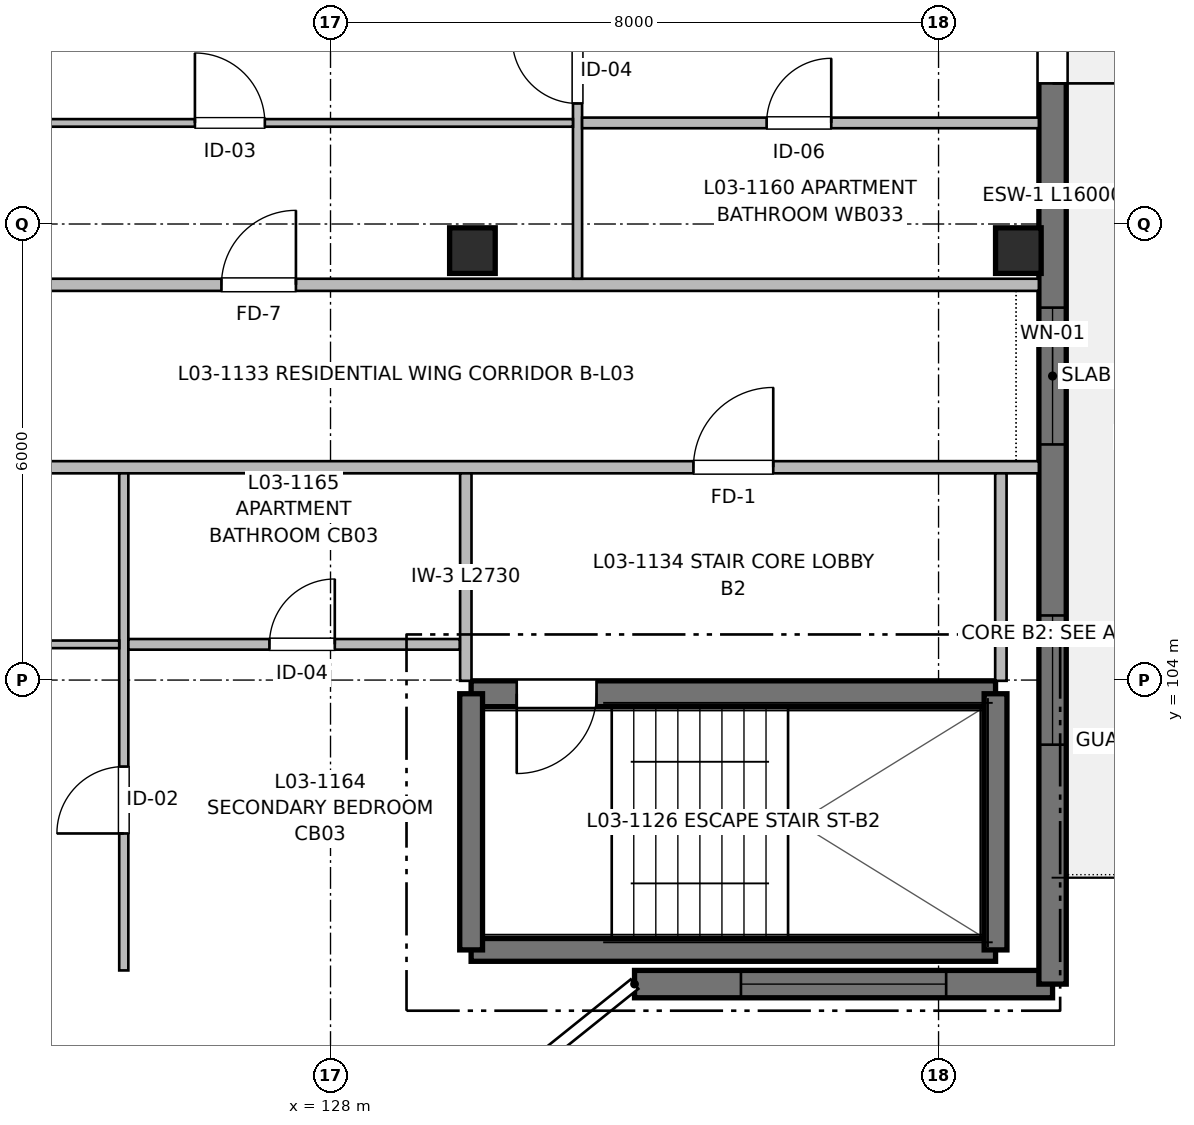
"""IFC4 building model, lengths in metres.
Left out: names, types, materials, properties, quantities, classifications, styles, units other than length and angle.
Written with IfcOpenShell. Run it as: python <this file> out.ifc"""

import sys

from ifc_helpers import new_model, si_unit, direction, frame, frame_2d, origin, origin_2d, place, context, subcontext, project, spatial, rectangle, extrude, element, fill, save


model = new_model("IFC4")
c1 = context("Model", 3, precision=1e-05, world=origin(), true_north=direction((0.0, 1.0)))
c2 = subcontext(c1, "Body", "Model", "MODEL_VIEW")
j1 = project(units=[si_unit("LENGTHUNIT", "METRE"), si_unit("PLANEANGLEUNIT", "RADIAN")], contexts=[c1])
p1 = place(None, origin())
s1 = spatial("IfcSite", under=j1, at=p1, CompositionType="ELEMENT")
p2 = place(p1, origin())
s2 = spatial("IfcBuilding", under=s1, at=p2, CompositionType="ELEMENT")
p3 = place(p2, frame((0.0, 0.0, 10.56)))
s3 = spatial("IfcBuildingStorey", under=s2, at=p3, CompositionType="ELEMENT", Elevation=10.56)
for number, where, z_axis, x_axis in (
    (1, (129.867, 109.65, 0.0), (0.0, 0.0, 1.0), (1.0, 0.0, 0.0)),
    (2, (137.05, 109.65, 0.0), (0.0, 0.0, 1.0), (1.0, 0.0, 0.0)),
):
    element("IfcColumn", number, at=place(p3, frame(where, z_axis=z_axis, x_axis=x_axis)), inside=s3, PredefinedType="COLUMN", context=c2, shape_type="SweptSolid", body=[
        extrude(rectangle(XDim=0.6, YDim=0.6, at=origin_2d()), origin(), (0.0, 0.0, 1.0), 3.2),
    ])
p4 = place(p3, frame((129.85, 100.45, 0.0), z_axis=(0.0, 0.0, 1.0), x_axis=(1.0, 0.0, 0.0)))
e3 = element("IfcWall", 3, at=p4, inside=s3, PredefinedType="SHEAR", context=c2, shape_type="SweptSolid", body=[
    extrude(rectangle(XDim=6.9, YDim=0.3, at=frame_2d((3.45, 0.0))), origin(), (0.0, 0.0, 1.0), 3.2),
])
p5 = place(p3, frame((136.75, 103.82, 0.0), z_axis=(0.0, 0.0, 1.0), x_axis=(-1.0, 0.0, 0.0)))
e4 = element("IfcWall", 4, at=p5, inside=s3, PredefinedType="SHEAR", context=c2, shape_type="SweptSolid", body=[
    extrude(rectangle(XDim=6.9, YDim=0.34, at=frame_2d((3.45, 0.0))), origin(), (0.0, 0.0, 1.0), 3.2),
])
p6 = place(p5, frame((5.25, 0.0, 0.0)))
e5 = element("IfcOpeningElement", 5, at=p6, cuts=e4, PredefinedType="OPENING", context=c2, shape_type="SweptSolid", body=[
    extrude(rectangle(XDim=1.05, YDim=2.15, at=frame_2d((0.525, 1.075))), frame((0.0, 0.18, 0.0), z_axis=(0.0, -1.0, 0.0), x_axis=(1.0, 0.0, 0.0)), (0.0, 0.0, 1.0), 0.36),
])
for number, where, z_axis, x_axis in (
    (6, (129.85, 103.82, 0.0), (0.0, 0.0, 1.0), (0.0, -1.0, 0.0)),
    (7, (136.75, 100.45, 0.0), (0.0, 0.0, 1.0), (0.0, 1.0, 0.0)),
):
    element("IfcWall", number, at=place(p3, frame(where, z_axis=z_axis, x_axis=x_axis)), inside=s3, PredefinedType="SHEAR", context=c2, shape_type="SweptSolid", body=[
        extrude(rectangle(XDim=3.37, YDim=0.3, at=frame_2d((1.685, 0.0))), origin(), (0.0, 0.0, 1.0), 3.2),
    ])
p7 = place(p3, frame((137.5, 100.0, 0.0), z_axis=(0.0, 0.0, 1.0), x_axis=(-1.0, 0.0, 0.0)))
e8 = element("IfcWall", 8, at=p7, inside=s3, PredefinedType="SHEAR", context=c2, shape_type="SweptSolid", body=[
    extrude(rectangle(XDim=5.5, YDim=0.36, at=frame_2d((2.75, 0.0))), origin(), (0.0, 0.0, 1.0), 2.98),
])
p8 = place(p7, frame((1.4, 0.0, 0.47)))
e9 = element("IfcOpeningElement", 9, at=p8, cuts=e8, PredefinedType="OPENING", context=c2, shape_type="SweptSolid", body=[
    extrude(rectangle(XDim=2.7, YDim=1.75, at=frame_2d((1.35, 0.875))), frame((0.0, 0.19, 0.0), z_axis=(0.0, -1.0, 0.0), x_axis=(1.0, 0.0, 0.0)), (0.0, 0.0, 1.0), 0.38),
])
p9 = place(p3, frame((137.5, 116.0, 0.0), z_axis=(0.0, 0.0, 1.0), x_axis=(0.0, -1.0, 0.0)))
e10 = element("IfcWall", 10, at=p9, inside=s3, PredefinedType="SHEAR", context=c2, shape_type="SweptSolid", body=[
    extrude(rectangle(XDim=16.0, YDim=0.36, at=frame_2d((8.0, 0.0))), origin(), (0.0, 0.0, 1.0), 2.98),
])
p10 = place(p9, frame((2.95, 0.0, 0.0)))
e11 = element("IfcOpeningElement", 11, at=p10, cuts=e10, PredefinedType="OPENING", context=c2, shape_type="SweptSolid", body=[
    extrude(rectangle(XDim=1.2, YDim=2.2, at=frame_2d((0.6, 1.1))), frame((0.0, 0.19, 0.0), z_axis=(0.0, -1.0, 0.0), x_axis=(1.0, 0.0, 0.0)), (0.0, 0.0, 1.0), 0.38),
])
p11 = place(p9, frame((7.1, 0.0, 0.72)))
e12 = element("IfcOpeningElement", 12, at=p11, cuts=e10, PredefinedType="OPENING", context=c2, shape_type="SweptSolid", body=[
    extrude(rectangle(XDim=1.8, YDim=1.5, at=frame_2d((0.9, 0.75))), frame((0.0, 0.19, 0.0), z_axis=(0.0, -1.0, 0.0), x_axis=(1.0, 0.0, 0.0)), (0.0, 0.0, 1.0), 0.38),
])
p12 = place(p9, frame((11.15, 0.0, 0.72)))
e13 = element("IfcOpeningElement", 13, at=p12, cuts=e10, PredefinedType="OPENING", context=c2, shape_type="SweptSolid", body=[
    extrude(rectangle(XDim=1.7, YDim=1.5, at=frame_2d((0.85, 0.75))), frame((0.0, 0.19, 0.0), z_axis=(0.0, -1.0, 0.0), x_axis=(1.0, 0.0, 0.0)), (0.0, 0.0, 1.0), 0.38),
])
p13 = place(p3, frame((113.2, 106.8, 0.0), z_axis=(0.0, 0.0, 1.0), x_axis=(1.0, 0.0, 0.0)))
e14 = element("IfcWall", 14, at=p13, inside=s3, PredefinedType="PARTITIONING", context=c2, shape_type="SweptSolid", body=[
    extrude(rectangle(XDim=24.12, YDim=0.16, at=frame_2d((12.06, 0.0))), origin(), (0.0, 0.0, 1.0), 2.935),
])
p14 = place(p13, frame((19.575, 0.0, 0.0)))
e15 = element("IfcOpeningElement", 15, at=p14, cuts=e14, PredefinedType="OPENING", context=c2, shape_type="SweptSolid", body=[
    extrude(rectangle(XDim=1.05, YDim=2.15, at=frame_2d((0.525, 1.075))), frame((0.0, 0.09, 0.0), z_axis=(0.0, -1.0, 0.0), x_axis=(1.0, 0.0, 0.0)), (0.0, 0.0, 1.0), 0.18),
])
p15 = place(p13, frame((8.995, 0.0, 0.0)))
e16 = element("IfcOpeningElement", 16, at=p15, cuts=e14, PredefinedType="OPENING", context=c2, shape_type="SweptSolid", body=[
    extrude(rectangle(XDim=0.98, YDim=2.15, at=frame_2d((0.49, 1.075))), frame((0.0, 0.09, 0.0), z_axis=(0.0, -1.0, 0.0), x_axis=(1.0, 0.0, 0.0)), (0.0, 0.0, 1.0), 0.18),
])
p16 = place(p3, frame((93.68, 109.2, 0.0), z_axis=(0.0, 0.0, 1.0), x_axis=(1.0, 0.0, 0.0)))
e17 = element("IfcWall", 17, at=p16, inside=s3, PredefinedType="PARTITIONING", context=c2, shape_type="SweptSolid", body=[
    extrude(rectangle(XDim=43.64, YDim=0.16, at=frame_2d((21.82, 0.0))), origin(), (0.0, 0.0, 1.0), 2.935),
])
p17 = place(p16, frame((3.705, 0.0, 0.0)))
e18 = element("IfcOpeningElement", 18, at=p17, cuts=e17, PredefinedType="OPENING", context=c2, shape_type="SweptSolid", body=[
    extrude(rectangle(XDim=0.98, YDim=2.15, at=frame_2d((0.49, 1.075))), frame((0.0, 0.09, 0.0), z_axis=(0.0, -1.0, 0.0), x_axis=(1.0, 0.0, 0.0)), (0.0, 0.0, 1.0), 0.18),
])
p18 = place(p16, frame((18.315, 0.0, 0.0)))
e19 = element("IfcOpeningElement", 19, at=p18, cuts=e17, PredefinedType="OPENING", context=c2, shape_type="SweptSolid", body=[
    extrude(rectangle(XDim=0.98, YDim=2.15, at=frame_2d((0.49, 1.075))), frame((0.0, 0.09, 0.0), z_axis=(0.0, -1.0, 0.0), x_axis=(1.0, 0.0, 0.0)), (0.0, 0.0, 1.0), 0.18),
])
p19 = place(p16, frame((32.885, 0.0, 0.0)))
e20 = element("IfcOpeningElement", 20, at=p19, cuts=e17, PredefinedType="OPENING", context=c2, shape_type="SweptSolid", body=[
    extrude(rectangle(XDim=0.98, YDim=2.15, at=frame_2d((0.49, 1.075))), frame((0.0, 0.09, 0.0), z_axis=(0.0, -1.0, 0.0), x_axis=(1.0, 0.0, 0.0)), (0.0, 0.0, 1.0), 0.18),
])
for number, where, z_axis, x_axis in (
    (21, (129.78, 103.99, 0.0), (0.0, 0.0, 1.0), (0.0, 1.0, 0.0)),
    (22, (136.82, 103.99, 0.0), (0.0, 0.0, 1.0), (0.0, 1.0, 0.0)),
):
    element("IfcWall", number, at=place(p3, frame(where, z_axis=z_axis, x_axis=x_axis)), inside=s3, PredefinedType="PARTITIONING", context=c2, shape_type="SweptSolid", body=[
        extrude(rectangle(XDim=2.73, YDim=0.15, at=frame_2d((1.365, 0.0))), origin(), (0.0, 0.0, 1.0), 2.935),
    ])
p20 = place(p3, frame((131.25, 109.28, 0.0), z_axis=(0.0, 0.0, 1.0), x_axis=(0.0, 1.0, 0.0)))
e23 = element("IfcWall", 23, at=p20, inside=s3, PredefinedType="PARTITIONING", context=c2, shape_type="SweptSolid", body=[
    extrude(rectangle(XDim=6.6, YDim=0.12, at=frame_2d((3.3, 0.0))), origin(), (0.0, 0.0, 1.0), 2.935),
])
p21 = place(p20, frame((2.306, 0.0, 0.0)))
e24 = element("IfcOpeningElement", 24, at=p21, cuts=e23, PredefinedType="OPENING", context=c2, shape_type="SweptSolid", body=[
    extrude(rectangle(XDim=0.86, YDim=2.1, at=frame_2d((0.43, 1.05))), frame((0.0, 0.07, 0.0), z_axis=(0.0, -1.0, 0.0), x_axis=(1.0, 0.0, 0.0)), (0.0, 0.0, 1.0), 0.14),
])
p22 = place(p20, frame((4.097, 0.0, 0.0)))
e25 = element("IfcOpeningElement", 25, at=p22, cuts=e23, PredefinedType="OPENING", context=c2, shape_type="SweptSolid", body=[
    extrude(rectangle(XDim=0.9, YDim=2.1, at=frame_2d((0.45, 1.05))), frame((0.0, 0.07, 0.0), z_axis=(0.0, -1.0, 0.0), x_axis=(1.0, 0.0, 0.0)), (0.0, 0.0, 1.0), 0.14),
])
p23 = place(p3, frame((131.31, 111.33, 0.0), z_axis=(0.0, 0.0, 1.0), x_axis=(1.0, 0.0, 0.0)))
e26 = element("IfcWall", 26, at=p23, inside=s3, PredefinedType="PARTITIONING", context=c2, shape_type="SweptSolid", body=[
    extrude(rectangle(XDim=6.01, YDim=0.14, at=frame_2d((3.005, 0.0))), origin(), (0.0, 0.0, 1.0), 2.935),
])
p24 = place(p23, frame((2.428, 0.0, 0.0)))
e27 = element("IfcOpeningElement", 27, at=p24, cuts=e26, PredefinedType="OPENING", context=c2, shape_type="SweptSolid", body=[
    extrude(rectangle(XDim=0.85, YDim=2.05, at=frame_2d((0.425, 1.025))), frame((0.0, 0.08, 0.0), z_axis=(0.0, -1.0, 0.0), x_axis=(1.0, 0.0, 0.0)), (0.0, 0.0, 1.0), 0.16),
])
p25 = place(p3, frame((122.86, 111.33, 0.0), z_axis=(0.0, 0.0, 1.0), x_axis=(1.0, 0.0, 0.0)))
e28 = element("IfcWall", 28, at=p25, inside=s3, PredefinedType="PARTITIONING", context=c2, shape_type="SweptSolid", body=[
    extrude(rectangle(XDim=8.33, YDim=0.1, at=frame_2d((4.165, 0.0))), origin(), (0.0, 0.0, 1.0), 2.935),
])
p26 = place(p25, frame((3.356, 0.0, 0.0)))
e29 = element("IfcOpeningElement", 29, at=p26, cuts=e28, PredefinedType="OPENING", context=c2, shape_type="SweptSolid", body=[
    extrude(rectangle(XDim=0.92, YDim=2.1, at=frame_2d((0.46, 1.05))), frame((0.0, 0.06, 0.0), z_axis=(0.0, -1.0, 0.0), x_axis=(1.0, 0.0, 0.0)), (0.0, 0.0, 1.0), 0.12),
])
p27 = place(p3, frame((125.28, 100.18, 0.0), z_axis=(0.0, 0.0, 1.0), x_axis=(0.0, 1.0, 0.0)))
e30 = element("IfcWall", 30, at=p27, inside=s3, PredefinedType="PARTITIONING", context=c2, shape_type="SweptSolid", body=[
    extrude(rectangle(XDim=6.54, YDim=0.12, at=frame_2d((3.27, 0.0))), origin(), (0.0, 0.0, 1.0), 2.935),
])
p28 = place(p27, frame((1.802, 0.0, 0.0)))
e31 = element("IfcOpeningElement", 31, at=p28, cuts=e30, PredefinedType="OPENING", context=c2, shape_type="SweptSolid", body=[
    extrude(rectangle(XDim=0.88, YDim=2.1, at=frame_2d((0.44, 1.05))), frame((0.0, 0.07, 0.0), z_axis=(0.0, -1.0, 0.0), x_axis=(1.0, 0.0, 0.0)), (0.0, 0.0, 1.0), 0.14),
])
p29 = place(p3, frame((125.34, 104.47, 0.0), z_axis=(0.0, 0.0, 1.0), x_axis=(1.0, 0.0, 0.0)))
e32 = element("IfcWall", 32, at=p29, inside=s3, PredefinedType="PARTITIONING", context=c2, shape_type="SweptSolid", body=[
    extrude(rectangle(XDim=4.36, YDim=0.14, at=frame_2d((2.18, 0.0))), origin(), (0.0, 0.0, 1.0), 2.935),
])
p30 = place(p29, frame((1.856, 0.0, 0.0)))
e33 = element("IfcOpeningElement", 33, at=p30, cuts=e32, PredefinedType="OPENING", context=c2, shape_type="SweptSolid", body=[
    extrude(rectangle(XDim=0.86, YDim=2.1, at=frame_2d((0.43, 1.05))), frame((0.0, 0.08, 0.0), z_axis=(0.0, -1.0, 0.0), x_axis=(1.0, 0.0, 0.0)), (0.0, 0.0, 1.0), 0.16),
])
p31 = place(p3, frame((120.09, 104.47, 0.0), z_axis=(0.0, 0.0, 1.0), x_axis=(1.0, 0.0, 0.0)))
e34 = element("IfcWall", 34, at=p31, inside=s3, PredefinedType="PARTITIONING", context=c2, shape_type="SweptSolid", body=[
    extrude(rectangle(XDim=5.13, YDim=0.1, at=frame_2d((2.565, 0.0))), origin(), (0.0, 0.0, 1.0), 2.935),
])
p32 = place(p31, frame((2.18, 0.0, 0.0)))
e35 = element("IfcOpeningElement", 35, at=p32, cuts=e34, PredefinedType="OPENING", context=c2, shape_type="SweptSolid", body=[
    extrude(rectangle(XDim=0.92, YDim=2.1, at=frame_2d((0.46, 1.05))), frame((0.0, 0.06, 0.0), z_axis=(0.0, -1.0, 0.0), x_axis=(1.0, 0.0, 0.0)), (0.0, 0.0, 1.0), 0.12),
])
p33 = place(p6, origin())
e36 = element("IfcDoor", 36, at=p33, inside=s3, OperationType="SINGLE_SWING_RIGHT", PredefinedType="DOOR", context=c2, shape_type="SweptSolid", body=[
    extrude(rectangle(XDim=1.05, YDim=2.15, at=frame_2d((0.525, 1.075))), frame((0.0, 0.025, 0.0), z_axis=(0.0, -1.0, 0.0), x_axis=(1.0, 0.0, 0.0)), (0.0, 0.0, 1.0), 0.05),
])
fill(e5, e36)
p34 = place(p8, origin())
e37 = element("IfcWindow", 37, at=p34, inside=s3, PartitioningType="SINGLE_PANEL", PredefinedType="WINDOW", context=c2, shape_type="SweptSolid", body=[
    extrude(rectangle(XDim=2.7, YDim=1.75, at=frame_2d((1.35, 0.875))), frame((0.0, 0.03, 0.0), z_axis=(0.0, -1.0, 0.0), x_axis=(1.0, 0.0, 0.0)), (0.0, 0.0, 1.0), 0.06),
])
fill(e9, e37)
p35 = place(p10, origin())
e38 = element("IfcDoor", 38, at=p35, inside=s3, OperationType="SINGLE_SWING_RIGHT", PredefinedType="DOOR", context=c2, shape_type="SweptSolid", body=[
    extrude(rectangle(XDim=1.2, YDim=2.2, at=frame_2d((0.6, 1.1))), frame((0.0, 0.025, 0.0), z_axis=(0.0, -1.0, 0.0), x_axis=(1.0, 0.0, 0.0)), (0.0, 0.0, 1.0), 0.05),
])
fill(e11, e38)
p36 = place(p11, origin())
e39 = element("IfcWindow", 39, at=p36, inside=s3, PartitioningType="SINGLE_PANEL", PredefinedType="WINDOW", context=c2, shape_type="SweptSolid", body=[
    extrude(rectangle(XDim=1.8, YDim=1.5, at=frame_2d((0.9, 0.75))), frame((0.0, 0.03, 0.0), z_axis=(0.0, -1.0, 0.0), x_axis=(1.0, 0.0, 0.0)), (0.0, 0.0, 1.0), 0.06),
])
fill(e12, e39)
p37 = place(p12, origin())
e40 = element("IfcWindow", 40, at=p37, inside=s3, PartitioningType="SINGLE_PANEL", PredefinedType="WINDOW", context=c2, shape_type="SweptSolid", body=[
    extrude(rectangle(XDim=1.7, YDim=1.5, at=frame_2d((0.85, 0.75))), frame((0.0, 0.03, 0.0), z_axis=(0.0, -1.0, 0.0), x_axis=(1.0, 0.0, 0.0)), (0.0, 0.0, 1.0), 0.06),
])
fill(e13, e40)
p38 = place(p14, origin())
e41 = element("IfcDoor", 41, at=p38, inside=s3, OperationType="SINGLE_SWING_RIGHT", PredefinedType="DOOR", context=c2, shape_type="SweptSolid", body=[
    extrude(rectangle(XDim=1.05, YDim=2.15, at=frame_2d((0.525, 1.075))), frame((0.0, 0.025, 0.0), z_axis=(0.0, -1.0, 0.0), x_axis=(1.0, 0.0, 0.0)), (0.0, 0.0, 1.0), 0.05),
])
fill(e15, e41)
p39 = place(p19, origin())
e42 = element("IfcDoor", 42, at=p39, inside=s3, OperationType="SINGLE_SWING_RIGHT", PredefinedType="DOOR", context=c2, shape_type="SweptSolid", body=[
    extrude(rectangle(XDim=0.98, YDim=2.15, at=frame_2d((0.49, 1.075))), frame((0.0, 0.025, 0.0), z_axis=(0.0, -1.0, 0.0), x_axis=(1.0, 0.0, 0.0)), (0.0, 0.0, 1.0), 0.05),
])
fill(e20, e42)
p40 = place(p26, origin())
e43 = element("IfcDoor", 43, at=p40, inside=s3, OperationType="SINGLE_SWING_LEFT", PredefinedType="DOOR", context=c2, shape_type="SweptSolid", body=[
    extrude(rectangle(XDim=0.92, YDim=2.1, at=frame_2d((0.46, 1.05))), frame((0.0, 0.025, 0.0), z_axis=(0.0, -1.0, 0.0), x_axis=(1.0, 0.0, 0.0)), (0.0, 0.0, 1.0), 0.05),
])
fill(e29, e43)
p41 = place(p21, origin())
e44 = element("IfcDoor", 44, at=p41, inside=s3, OperationType="SINGLE_SWING_RIGHT", PredefinedType="DOOR", context=c2, shape_type="SweptSolid", body=[
    extrude(rectangle(XDim=0.86, YDim=2.1, at=frame_2d((0.43, 1.05))), frame((0.0, 0.025, 0.0), z_axis=(0.0, -1.0, 0.0), x_axis=(1.0, 0.0, 0.0)), (0.0, 0.0, 1.0), 0.05),
])
fill(e24, e44)
p42 = place(p24, origin())
e45 = element("IfcDoor", 45, at=p42, inside=s3, OperationType="SINGLE_SWING_RIGHT", PredefinedType="DOOR", context=c2, shape_type="SweptSolid", body=[
    extrude(rectangle(XDim=0.85, YDim=2.05, at=frame_2d((0.425, 1.025))), frame((0.0, 0.025, 0.0), z_axis=(0.0, -1.0, 0.0), x_axis=(1.0, 0.0, 0.0)), (0.0, 0.0, 1.0), 0.05),
])
fill(e27, e45)
p43 = place(p28, origin())
e46 = element("IfcDoor", 46, at=p43, inside=s3, OperationType="SINGLE_SWING_LEFT", PredefinedType="DOOR", context=c2, shape_type="SweptSolid", body=[
    extrude(rectangle(XDim=0.88, YDim=2.1, at=frame_2d((0.44, 1.05))), frame((0.0, 0.025, 0.0), z_axis=(0.0, -1.0, 0.0), x_axis=(1.0, 0.0, 0.0)), (0.0, 0.0, 1.0), 0.05),
])
fill(e31, e46)
p44 = place(p30, origin())
e47 = element("IfcDoor", 47, at=p44, inside=s3, OperationType="SINGLE_SWING_RIGHT", PredefinedType="DOOR", context=c2, shape_type="SweptSolid", body=[
    extrude(rectangle(XDim=0.86, YDim=2.1, at=frame_2d((0.43, 1.05))), frame((0.0, 0.025, 0.0), z_axis=(0.0, -1.0, 0.0), x_axis=(1.0, 0.0, 0.0)), (0.0, 0.0, 1.0), 0.05),
])
fill(e33, e47)
save(model, sys.argv[1])
